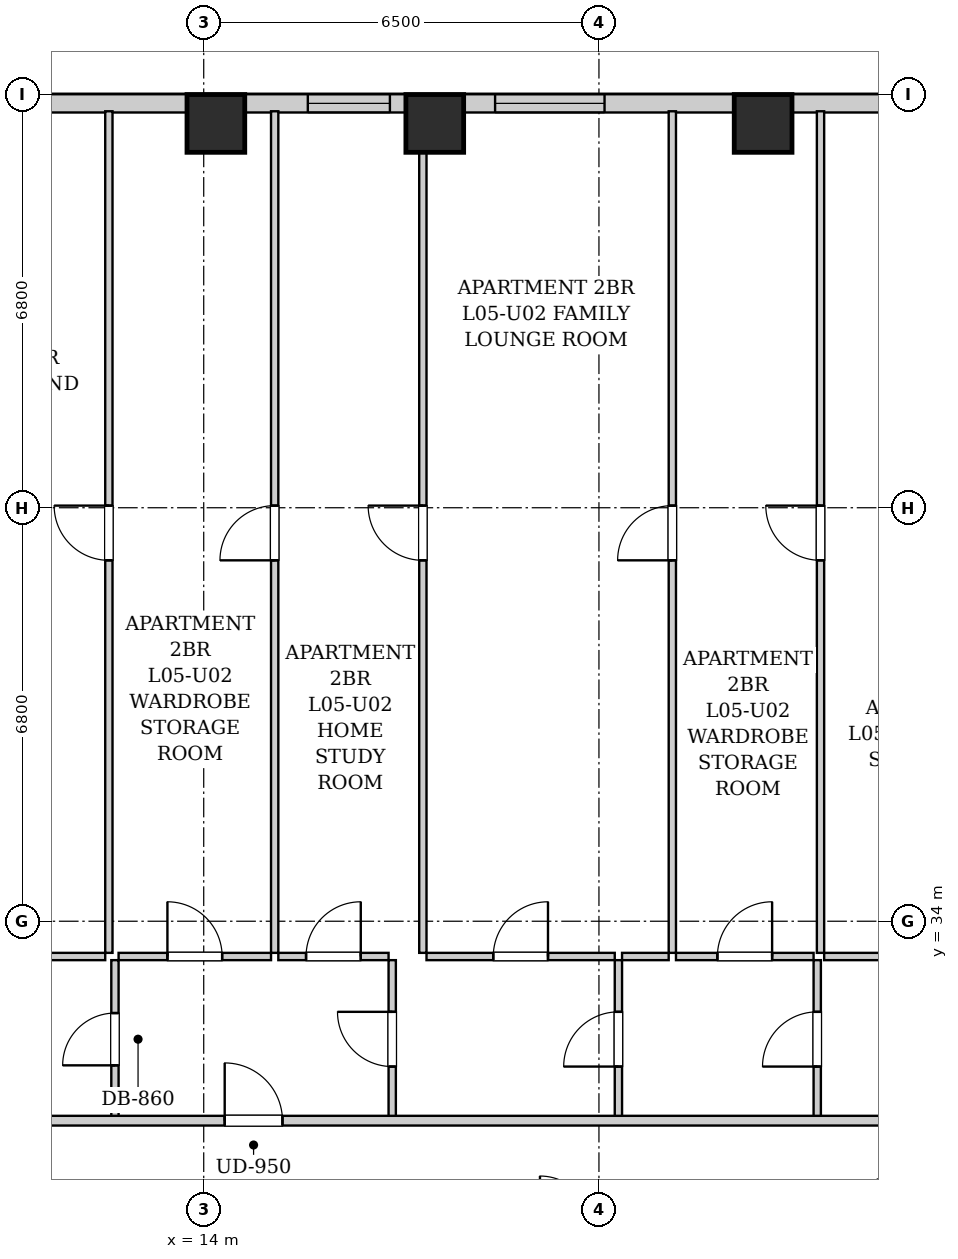
"""IFC4 building model, lengths in metres.
Left out: names, types, materials, properties, quantities, classifications, styles, units other than length and angle.
Written with IfcOpenShell. Run it as: python <this file> out.ifc"""

import sys

from ifc_helpers import new_model, si_unit, direction, frame, frame_2d, origin, origin_2d, place, context, subcontext, project, spatial, rectangle, extrude, element, fill, save


model = new_model("IFC4")
c1 = context("Model", 3, precision=1e-05, world=origin(), true_north=direction((0.0, 1.0)))
c2 = subcontext(c1, "Body", "Model", "MODEL_VIEW")
j1 = project(units=[si_unit("LENGTHUNIT", "METRE"), si_unit("PLANEANGLEUNIT", "RADIAN")], contexts=[c1])
p1 = place(None, origin())
s1 = spatial("IfcSite", under=j1, at=p1, CompositionType="ELEMENT")
p2 = place(p1, origin())
s2 = spatial("IfcBuilding", under=s1, at=p2, CompositionType="ELEMENT")
p3 = place(p2, frame((0.0, 0.0, 25.8)))
s3 = spatial("IfcBuildingStorey", under=s2, at=p3, CompositionType="ELEMENT", Elevation=25.8)
for number, where, z_axis, x_axis in (
    (1, (14.2, 47.12, 0.0), (0.0, 0.0, 1.0), (1.0, 0.0, 0.0)),
    (2, (17.8, 47.12, 0.0), (0.0, 0.0, 1.0), (1.0, 0.0, 0.0)),
    (3, (23.2, 47.12, 0.0), (0.0, 0.0, 1.0), (1.0, 0.0, 0.0)),
):
    element("IfcColumn", number, at=place(p3, frame(where, z_axis=z_axis, x_axis=x_axis)), inside=s3, PredefinedType="COLUMN", context=c2, shape_type="SweptSolid", body=[
        extrude(rectangle(XDim=0.95, YDim=0.95, at=origin_2d()), origin(), (0.0, 0.0, 1.0), 3.2),
    ])
p4 = place(p3, frame((10.0, 47.45, 0.0), z_axis=(0.0, 0.0, 1.0), x_axis=(1.0, 0.0, 0.0)))
e4 = element("IfcWall", 4, at=p4, inside=s3, PredefinedType="SOLIDWALL", context=c2, shape_type="SweptSolid", body=[
    extrude(rectangle(XDim=28.1, YDim=0.3, at=frame_2d((14.05, 0.0))), origin(), (0.0, 0.0, 1.0), 1.975),
])
p5 = place(p4, frame((5.712, 0.0, 0.55)))
e5 = element("IfcOpeningElement", 5, at=p5, cuts=e4, PredefinedType="OPENING", context=c2, shape_type="SweptSolid", body=[
    extrude(rectangle(XDim=1.35, YDim=1.2, at=frame_2d((0.675, 0.6))), frame((0.0, 0.16, 0.0), z_axis=(0.0, -1.0, 0.0), x_axis=(1.0, 0.0, 0.0)), (0.0, 0.0, 1.0), 0.32),
])
p6 = place(p4, frame((8.792, 0.0, 0.55)))
e6 = element("IfcOpeningElement", 6, at=p6, cuts=e4, PredefinedType="OPENING", context=c2, shape_type="SweptSolid", body=[
    extrude(rectangle(XDim=1.8, YDim=1.2, at=frame_2d((0.9, 0.6))), frame((0.0, 0.16, 0.0), z_axis=(0.0, -1.0, 0.0), x_axis=(1.0, 0.0, 0.0)), (0.0, 0.0, 1.0), 0.32),
])
p7 = place(p4, frame((18.86, 0.0, 0.55)))
e7 = element("IfcOpeningElement", 7, at=p7, cuts=e4, PredefinedType="OPENING", context=c2, shape_type="SweptSolid", body=[
    extrude(rectangle(XDim=1.8, YDim=1.2, at=frame_2d((0.9, 0.6))), frame((0.0, 0.16, 0.0), z_axis=(0.0, -1.0, 0.0), x_axis=(1.0, 0.0, 0.0)), (0.0, 0.0, 1.0), 0.32),
])
p8 = place(p4, frame((21.215, 0.0, 0.55)))
e8 = element("IfcOpeningElement", 8, at=p8, cuts=e4, PredefinedType="OPENING", context=c2, shape_type="SweptSolid", body=[
    extrude(rectangle(XDim=1.35, YDim=1.2, at=frame_2d((0.675, 0.6))), frame((0.0, 0.16, 0.0), z_axis=(0.0, -1.0, 0.0), x_axis=(1.0, 0.0, 0.0)), (0.0, 0.0, 1.0), 0.32),
])
p9 = place(p4, frame((23.969, 0.0, 0.55)))
e9 = element("IfcOpeningElement", 9, at=p9, cuts=e4, PredefinedType="OPENING", context=c2, shape_type="SweptSolid", body=[
    extrude(rectangle(XDim=1.8, YDim=1.2, at=frame_2d((0.9, 0.6))), frame((0.0, 0.16, 0.0), z_axis=(0.0, -1.0, 0.0), x_axis=(1.0, 0.0, 0.0)), (0.0, 0.0, 1.0), 0.32),
])
p10 = place(p4, frame((26.698, 0.0, 0.55)))
e10 = element("IfcOpeningElement", 10, at=p10, cuts=e4, PredefinedType="OPENING", context=c2, shape_type="SweptSolid", body=[
    extrude(rectangle(XDim=0.85, YDim=1.2, at=frame_2d((0.425, 0.6))), frame((0.0, 0.16, 0.0), z_axis=(0.0, -1.0, 0.0), x_axis=(1.0, 0.0, 0.0)), (0.0, 0.0, 1.0), 0.32),
])
p11 = place(p3, frame((12.54, 30.76, 0.0), z_axis=(0.0, 0.0, 1.0), x_axis=(0.0, 1.0, 0.0)))
e11 = element("IfcWall", 11, at=p11, inside=s3, PredefinedType="PARTITIONING", context=c2, shape_type="SweptSolid", body=[
    extrude(rectangle(XDim=2.6, YDim=0.12, at=frame_2d((1.3, 0.0))), origin(), (0.0, 0.0, 1.0), 2.94),
])
p12 = place(p11, frame((0.87, 0.0, 0.0)))
e12 = element("IfcOpeningElement", 12, at=p12, cuts=e11, PredefinedType="OPENING", context=c2, shape_type="SweptSolid", body=[
    extrude(rectangle(XDim=0.86, YDim=2.05, at=frame_2d((0.43, 1.025))), frame((0.0, 0.07, 0.0), z_axis=(0.0, -1.0, 0.0), x_axis=(1.0, 0.0, 0.0)), (0.0, 0.0, 1.0), 0.14),
])
p13 = place(p3, frame((10.08, 33.42, 0.0), z_axis=(0.0, 0.0, 1.0), x_axis=(1.0, 0.0, 0.0)))
e13 = element("IfcWall", 13, at=p13, inside=s3, PredefinedType="PARTITIONING", context=c2, shape_type="SweptSolid", body=[
    extrude(rectangle(XDim=2.3, YDim=0.12, at=frame_2d((1.15, 0.0))), origin(), (0.0, 0.0, 1.0), 2.94),
])
p14 = place(p3, frame((17.1, 30.76, 0.0), z_axis=(0.0, 0.0, 1.0), x_axis=(0.0, 1.0, 0.0)))
e14 = element("IfcWall", 14, at=p14, inside=s3, PredefinedType="PARTITIONING", context=c2, shape_type="SweptSolid", body=[
    extrude(rectangle(XDim=2.6, YDim=0.12, at=frame_2d((1.3, 0.0))), origin(), (0.0, 0.0, 1.0), 2.94),
])
p15 = place(p14, frame((0.85, 0.0, 0.0)))
e15 = element("IfcOpeningElement", 15, at=p15, cuts=e14, PredefinedType="OPENING", context=c2, shape_type="SweptSolid", body=[
    extrude(rectangle(XDim=0.9, YDim=2.05, at=frame_2d((0.45, 1.025))), frame((0.0, 0.07, 0.0), z_axis=(0.0, -1.0, 0.0), x_axis=(1.0, 0.0, 0.0)), (0.0, 0.0, 1.0), 0.14),
])
p16 = place(p3, frame((12.6, 33.42, 0.0), z_axis=(0.0, 0.0, 1.0), x_axis=(1.0, 0.0, 0.0)))
e16 = element("IfcWall", 16, at=p16, inside=s3, PredefinedType="PARTITIONING", context=c2, shape_type="SweptSolid", body=[
    extrude(rectangle(XDim=2.507, YDim=0.12, at=frame_2d((1.253, 0.0))), origin(), (0.0, 0.0, 1.0), 2.94),
])
p17 = place(p16, frame((0.803, 0.0, 0.0)))
e17 = element("IfcOpeningElement", 17, at=p17, cuts=e16, PredefinedType="OPENING", context=c2, shape_type="SweptSolid", body=[
    extrude(rectangle(XDim=0.9, YDim=2.05, at=frame_2d((0.45, 1.025))), frame((0.0, 0.07, 0.0), z_axis=(0.0, -1.0, 0.0), x_axis=(1.0, 0.0, 0.0)), (0.0, 0.0, 1.0), 0.14),
])
p18 = place(p3, frame((15.227, 33.42, 0.0), z_axis=(0.0, 0.0, 1.0), x_axis=(1.0, 0.0, 0.0)))
e18 = element("IfcWall", 18, at=p18, inside=s3, PredefinedType="PARTITIONING", context=c2, shape_type="SweptSolid", body=[
    extrude(rectangle(XDim=1.813, YDim=0.12, at=frame_2d((0.906, 0.0))), origin(), (0.0, 0.0, 1.0), 2.94),
])
p19 = place(p18, frame((0.456, 0.0, 0.0)))
e19 = element("IfcOpeningElement", 19, at=p19, cuts=e18, PredefinedType="OPENING", context=c2, shape_type="SweptSolid", body=[
    extrude(rectangle(XDim=0.9, YDim=2.05, at=frame_2d((0.45, 1.025))), frame((0.0, 0.07, 0.0), z_axis=(0.0, -1.0, 0.0), x_axis=(1.0, 0.0, 0.0)), (0.0, 0.0, 1.0), 0.14),
])
p20 = place(p3, frame((20.82, 30.76, 0.0), z_axis=(0.0, 0.0, 1.0), x_axis=(0.0, 1.0, 0.0)))
e20 = element("IfcWall", 20, at=p20, inside=s3, PredefinedType="PARTITIONING", context=c2, shape_type="SweptSolid", body=[
    extrude(rectangle(XDim=2.6, YDim=0.12, at=frame_2d((1.3, 0.0))), origin(), (0.0, 0.0, 1.0), 2.94),
])
p21 = place(p20, frame((0.85, 0.0, 0.0)))
e21 = element("IfcOpeningElement", 21, at=p21, cuts=e20, PredefinedType="OPENING", context=c2, shape_type="SweptSolid", body=[
    extrude(rectangle(XDim=0.9, YDim=2.05, at=frame_2d((0.45, 1.025))), frame((0.0, 0.07, 0.0), z_axis=(0.0, -1.0, 0.0), x_axis=(1.0, 0.0, 0.0)), (0.0, 0.0, 1.0), 0.14),
])
p22 = place(p3, frame((17.664, 33.42, 0.0), z_axis=(0.0, 0.0, 1.0), x_axis=(1.0, 0.0, 0.0)))
e22 = element("IfcWall", 22, at=p22, inside=s3, PredefinedType="PARTITIONING", context=c2, shape_type="SweptSolid", body=[
    extrude(rectangle(XDim=3.096, YDim=0.12, at=frame_2d((1.548, 0.0))), origin(), (0.0, 0.0, 1.0), 2.94),
])
p23 = place(p22, frame((1.098, 0.0, 0.0)))
e23 = element("IfcOpeningElement", 23, at=p23, cuts=e22, PredefinedType="OPENING", context=c2, shape_type="SweptSolid", body=[
    extrude(rectangle(XDim=0.9, YDim=2.05, at=frame_2d((0.45, 1.025))), frame((0.0, 0.07, 0.0), z_axis=(0.0, -1.0, 0.0), x_axis=(1.0, 0.0, 0.0)), (0.0, 0.0, 1.0), 0.14),
])
p24 = place(p3, frame((24.09, 30.76, 0.0), z_axis=(0.0, 0.0, 1.0), x_axis=(0.0, 1.0, 0.0)))
e24 = element("IfcWall", 24, at=p24, inside=s3, PredefinedType="PARTITIONING", context=c2, shape_type="SweptSolid", body=[
    extrude(rectangle(XDim=2.6, YDim=0.12, at=frame_2d((1.3, 0.0))), origin(), (0.0, 0.0, 1.0), 2.94),
])
p25 = place(p24, frame((0.85, 0.0, 0.0)))
e25 = element("IfcOpeningElement", 25, at=p25, cuts=e24, PredefinedType="OPENING", context=c2, shape_type="SweptSolid", body=[
    extrude(rectangle(XDim=0.9, YDim=2.05, at=frame_2d((0.45, 1.025))), frame((0.0, 0.07, 0.0), z_axis=(0.0, -1.0, 0.0), x_axis=(1.0, 0.0, 0.0)), (0.0, 0.0, 1.0), 0.14),
])
p26 = place(p3, frame((20.88, 33.42, 0.0), z_axis=(0.0, 0.0, 1.0), x_axis=(1.0, 0.0, 0.0)))
e26 = element("IfcWall", 26, at=p26, inside=s3, PredefinedType="PARTITIONING", context=c2, shape_type="SweptSolid", body=[
    extrude(rectangle(XDim=0.767, YDim=0.12, at=frame_2d((0.384, 0.0))), origin(), (0.0, 0.0, 1.0), 2.94),
])
p27 = place(p3, frame((21.767, 33.42, 0.0), z_axis=(0.0, 0.0, 1.0), x_axis=(1.0, 0.0, 0.0)))
e27 = element("IfcWall", 27, at=p27, inside=s3, PredefinedType="PARTITIONING", context=c2, shape_type="SweptSolid", body=[
    extrude(rectangle(XDim=2.263, YDim=0.12, at=frame_2d((1.131, 0.0))), origin(), (0.0, 0.0, 1.0), 2.94),
])
p28 = place(p27, frame((0.681, 0.0, 0.0)))
e28 = element("IfcOpeningElement", 28, at=p28, cuts=e27, PredefinedType="OPENING", context=c2, shape_type="SweptSolid", body=[
    extrude(rectangle(XDim=0.9, YDim=2.05, at=frame_2d((0.45, 1.025))), frame((0.0, 0.07, 0.0), z_axis=(0.0, -1.0, 0.0), x_axis=(1.0, 0.0, 0.0)), (0.0, 0.0, 1.0), 0.14),
])
p29 = place(p3, frame((24.204, 33.42, 0.0), z_axis=(0.0, 0.0, 1.0), x_axis=(1.0, 0.0, 0.0)))
e29 = element("IfcWall", 29, at=p29, inside=s3, PredefinedType="PARTITIONING", context=c2, shape_type="SweptSolid", body=[
    extrude(rectangle(XDim=3.546, YDim=0.12, at=frame_2d((1.773, 0.0))), origin(), (0.0, 0.0, 1.0), 2.94),
])
p30 = place(p29, frame((1.323, 0.0, 0.0)))
e30 = element("IfcOpeningElement", 30, at=p30, cuts=e29, PredefinedType="OPENING", context=c2, shape_type="SweptSolid", body=[
    extrude(rectangle(XDim=0.9, YDim=2.05, at=frame_2d((0.45, 1.025))), frame((0.0, 0.07, 0.0), z_axis=(0.0, -1.0, 0.0), x_axis=(1.0, 0.0, 0.0)), (0.0, 0.0, 1.0), 0.14),
])
p31 = place(p3, frame((12.44, 33.48, 0.0), z_axis=(0.0, 0.0, 1.0), x_axis=(0.0, 1.0, 0.0)))
e31 = element("IfcWall", 31, at=p31, inside=s3, PredefinedType="PARTITIONING", context=c2, shape_type="SweptSolid", body=[
    extrude(rectangle(XDim=13.84, YDim=0.12, at=frame_2d((6.92, 0.0))), origin(), (0.0, 0.0, 1.0), 2.94),
])
p32 = place(p31, frame((6.455, 0.0, 0.0)))
e32 = element("IfcOpeningElement", 32, at=p32, cuts=e31, PredefinedType="OPENING", context=c2, shape_type="SweptSolid", body=[
    extrude(rectangle(XDim=0.9, YDim=2.05, at=frame_2d((0.45, 1.025))), frame((0.0, 0.07, 0.0), z_axis=(0.0, -1.0, 0.0), x_axis=(1.0, 0.0, 0.0)), (0.0, 0.0, 1.0), 0.14),
])
p33 = place(p3, frame((15.167, 33.48, 0.0), z_axis=(0.0, 0.0, 1.0), x_axis=(0.0, 1.0, 0.0)))
e33 = element("IfcWall", 33, at=p33, inside=s3, PredefinedType="PARTITIONING", context=c2, shape_type="SweptSolid", body=[
    extrude(rectangle(XDim=13.84, YDim=0.12, at=frame_2d((6.92, 0.0))), origin(), (0.0, 0.0, 1.0), 2.94),
])
p34 = place(p33, frame((6.455, 0.0, 0.0)))
e34 = element("IfcOpeningElement", 34, at=p34, cuts=e33, PredefinedType="OPENING", context=c2, shape_type="SweptSolid", body=[
    extrude(rectangle(XDim=0.9, YDim=2.05, at=frame_2d((0.45, 1.025))), frame((0.0, 0.07, 0.0), z_axis=(0.0, -1.0, 0.0), x_axis=(1.0, 0.0, 0.0)), (0.0, 0.0, 1.0), 0.14),
])
p35 = place(p3, frame((17.604, 33.48, 0.0), z_axis=(0.0, 0.0, 1.0), x_axis=(0.0, 1.0, 0.0)))
e35 = element("IfcWall", 35, at=p35, inside=s3, PredefinedType="PARTITIONING", context=c2, shape_type="SweptSolid", body=[
    extrude(rectangle(XDim=13.84, YDim=0.12, at=frame_2d((6.92, 0.0))), origin(), (0.0, 0.0, 1.0), 2.94),
])
p36 = place(p35, frame((6.455, 0.0, 0.0)))
e36 = element("IfcOpeningElement", 36, at=p36, cuts=e35, PredefinedType="OPENING", context=c2, shape_type="SweptSolid", body=[
    extrude(rectangle(XDim=0.9, YDim=2.05, at=frame_2d((0.45, 1.025))), frame((0.0, 0.07, 0.0), z_axis=(0.0, -1.0, 0.0), x_axis=(1.0, 0.0, 0.0)), (0.0, 0.0, 1.0), 0.14),
])
p37 = place(p3, frame((21.707, 33.48, 0.0), z_axis=(0.0, 0.0, 1.0), x_axis=(0.0, 1.0, 0.0)))
e37 = element("IfcWall", 37, at=p37, inside=s3, PredefinedType="PARTITIONING", context=c2, shape_type="SweptSolid", body=[
    extrude(rectangle(XDim=13.84, YDim=0.12, at=frame_2d((6.92, 0.0))), origin(), (0.0, 0.0, 1.0), 2.94),
])
p38 = place(p37, frame((6.455, 0.0, 0.0)))
e38 = element("IfcOpeningElement", 38, at=p38, cuts=e37, PredefinedType="OPENING", context=c2, shape_type="SweptSolid", body=[
    extrude(rectangle(XDim=0.9, YDim=2.05, at=frame_2d((0.45, 1.025))), frame((0.0, 0.07, 0.0), z_axis=(0.0, -1.0, 0.0), x_axis=(1.0, 0.0, 0.0)), (0.0, 0.0, 1.0), 0.14),
])
p39 = place(p3, frame((24.144, 33.48, 0.0), z_axis=(0.0, 0.0, 1.0), x_axis=(0.0, 1.0, 0.0)))
e39 = element("IfcWall", 39, at=p39, inside=s3, PredefinedType="PARTITIONING", context=c2, shape_type="SweptSolid", body=[
    extrude(rectangle(XDim=13.84, YDim=0.12, at=frame_2d((6.92, 0.0))), origin(), (0.0, 0.0, 1.0), 2.94),
])
p40 = place(p39, frame((6.455, 0.0, 0.0)))
e40 = element("IfcOpeningElement", 40, at=p40, cuts=e39, PredefinedType="OPENING", context=c2, shape_type="SweptSolid", body=[
    extrude(rectangle(XDim=0.9, YDim=2.05, at=frame_2d((0.45, 1.025))), frame((0.0, 0.07, 0.0), z_axis=(0.0, -1.0, 0.0), x_axis=(1.0, 0.0, 0.0)), (0.0, 0.0, 1.0), 0.14),
])
p41 = place(p3, frame((10.05, 30.72, 0.0), z_axis=(0.0, 0.0, 1.0), x_axis=(1.0, 0.0, 0.0)))
e41 = element("IfcWall", 41, at=p41, inside=s3, PredefinedType="PARTITIONING", context=c2, shape_type="SweptSolid", body=[
    extrude(rectangle(XDim=33.9, YDim=0.16, at=frame_2d((16.95, 0.0))), origin(), (0.0, 0.0, 1.0), 2.94),
])
p42 = place(p41, frame((4.295, 0.0, 0.0)))
e42 = element("IfcOpeningElement", 42, at=p42, cuts=e41, PredefinedType="OPENING", context=c2, shape_type="SweptSolid", body=[
    extrude(rectangle(XDim=0.95, YDim=2.1, at=frame_2d((0.475, 1.05))), frame((0.0, 0.09, 0.0), z_axis=(0.0, -1.0, 0.0), x_axis=(1.0, 0.0, 0.0)), (0.0, 0.0, 1.0), 0.18),
])
p43 = place(p41, frame((27.235, 0.0, 0.0)))
e43 = element("IfcOpeningElement", 43, at=p43, cuts=e41, PredefinedType="OPENING", context=c2, shape_type="SweptSolid", body=[
    extrude(rectangle(XDim=0.95, YDim=2.1, at=frame_2d((0.475, 1.05))), frame((0.0, 0.09, 0.0), z_axis=(0.0, -1.0, 0.0), x_axis=(1.0, 0.0, 0.0)), (0.0, 0.0, 1.0), 0.18),
])
p44 = place(p12, origin())
e44 = element("IfcDoor", 44, at=p44, inside=s3, OperationType="SINGLE_SWING_LEFT", PredefinedType="DOOR", context=c2, shape_type="SweptSolid", body=[
    extrude(rectangle(XDim=0.86, YDim=2.05, at=frame_2d((0.43, 1.025))), frame((0.0, 0.025, 0.0), z_axis=(0.0, -1.0, 0.0), x_axis=(1.0, 0.0, 0.0)), (0.0, 0.0, 1.0), 0.05),
])
fill(e12, e44)
p45 = place(p15, origin())
e45 = element("IfcDoor", 45, at=p45, inside=s3, OperationType="SINGLE_SWING_RIGHT", PredefinedType="DOOR", context=c2, shape_type="SweptSolid", body=[
    extrude(rectangle(XDim=0.9, YDim=2.05, at=frame_2d((0.45, 1.025))), frame((0.0, 0.025, 0.0), z_axis=(0.0, -1.0, 0.0), x_axis=(1.0, 0.0, 0.0)), (0.0, 0.0, 1.0), 0.05),
])
fill(e15, e45)
p46 = place(p17, origin())
e46 = element("IfcDoor", 46, at=p46, inside=s3, OperationType="SINGLE_SWING_LEFT", PredefinedType="DOOR", context=c2, shape_type="SweptSolid", body=[
    extrude(rectangle(XDim=0.9, YDim=2.05, at=frame_2d((0.45, 1.025))), frame((0.0, 0.025, 0.0), z_axis=(0.0, -1.0, 0.0), x_axis=(1.0, 0.0, 0.0)), (0.0, 0.0, 1.0), 0.05),
])
fill(e17, e46)
p47 = place(p19, origin())
e47 = element("IfcDoor", 47, at=p47, inside=s3, OperationType="SINGLE_SWING_RIGHT", PredefinedType="DOOR", context=c2, shape_type="SweptSolid", body=[
    extrude(rectangle(XDim=0.9, YDim=2.05, at=frame_2d((0.45, 1.025))), frame((0.0, 0.025, 0.0), z_axis=(0.0, -1.0, 0.0), x_axis=(1.0, 0.0, 0.0)), (0.0, 0.0, 1.0), 0.05),
])
fill(e19, e47)
p48 = place(p21, origin())
e48 = element("IfcDoor", 48, at=p48, inside=s3, OperationType="SINGLE_SWING_LEFT", PredefinedType="DOOR", context=c2, shape_type="SweptSolid", body=[
    extrude(rectangle(XDim=0.9, YDim=2.05, at=frame_2d((0.45, 1.025))), frame((0.0, 0.025, 0.0), z_axis=(0.0, -1.0, 0.0), x_axis=(1.0, 0.0, 0.0)), (0.0, 0.0, 1.0), 0.05),
])
fill(e21, e48)
p49 = place(p23, origin())
e49 = element("IfcDoor", 49, at=p49, inside=s3, OperationType="SINGLE_SWING_RIGHT", PredefinedType="DOOR", context=c2, shape_type="SweptSolid", body=[
    extrude(rectangle(XDim=0.9, YDim=2.05, at=frame_2d((0.45, 1.025))), frame((0.0, 0.025, 0.0), z_axis=(0.0, -1.0, 0.0), x_axis=(1.0, 0.0, 0.0)), (0.0, 0.0, 1.0), 0.05),
])
fill(e23, e49)
p50 = place(p25, origin())
e50 = element("IfcDoor", 50, at=p50, inside=s3, OperationType="SINGLE_SWING_LEFT", PredefinedType="DOOR", context=c2, shape_type="SweptSolid", body=[
    extrude(rectangle(XDim=0.9, YDim=2.05, at=frame_2d((0.45, 1.025))), frame((0.0, 0.025, 0.0), z_axis=(0.0, -1.0, 0.0), x_axis=(1.0, 0.0, 0.0)), (0.0, 0.0, 1.0), 0.05),
])
fill(e25, e50)
p51 = place(p28, origin())
e51 = element("IfcDoor", 51, at=p51, inside=s3, OperationType="SINGLE_SWING_RIGHT", PredefinedType="DOOR", context=c2, shape_type="SweptSolid", body=[
    extrude(rectangle(XDim=0.9, YDim=2.05, at=frame_2d((0.45, 1.025))), frame((0.0, 0.025, 0.0), z_axis=(0.0, -1.0, 0.0), x_axis=(1.0, 0.0, 0.0)), (0.0, 0.0, 1.0), 0.05),
])
fill(e28, e51)
p52 = place(p32, origin())
e52 = element("IfcDoor", 52, at=p52, inside=s3, OperationType="SINGLE_SWING_RIGHT", PredefinedType="DOOR", context=c2, shape_type="SweptSolid", body=[
    extrude(rectangle(XDim=0.9, YDim=2.05, at=frame_2d((0.45, 1.025))), frame((0.0, 0.025, 0.0), z_axis=(0.0, -1.0, 0.0), x_axis=(1.0, 0.0, 0.0)), (0.0, 0.0, 1.0), 0.05),
])
fill(e32, e52)
p53 = place(p34, origin())
e53 = element("IfcDoor", 53, at=p53, inside=s3, OperationType="SINGLE_SWING_LEFT", PredefinedType="DOOR", context=c2, shape_type="SweptSolid", body=[
    extrude(rectangle(XDim=0.9, YDim=2.05, at=frame_2d((0.45, 1.025))), frame((0.0, 0.025, 0.0), z_axis=(0.0, -1.0, 0.0), x_axis=(1.0, 0.0, 0.0)), (0.0, 0.0, 1.0), 0.05),
])
fill(e34, e53)
p54 = place(p36, origin())
e54 = element("IfcDoor", 54, at=p54, inside=s3, OperationType="SINGLE_SWING_RIGHT", PredefinedType="DOOR", context=c2, shape_type="SweptSolid", body=[
    extrude(rectangle(XDim=0.9, YDim=2.05, at=frame_2d((0.45, 1.025))), frame((0.0, 0.025, 0.0), z_axis=(0.0, -1.0, 0.0), x_axis=(1.0, 0.0, 0.0)), (0.0, 0.0, 1.0), 0.05),
])
fill(e36, e54)
p55 = place(p38, origin())
e55 = element("IfcDoor", 55, at=p55, inside=s3, OperationType="SINGLE_SWING_LEFT", PredefinedType="DOOR", context=c2, shape_type="SweptSolid", body=[
    extrude(rectangle(XDim=0.9, YDim=2.05, at=frame_2d((0.45, 1.025))), frame((0.0, 0.025, 0.0), z_axis=(0.0, -1.0, 0.0), x_axis=(1.0, 0.0, 0.0)), (0.0, 0.0, 1.0), 0.05),
])
fill(e38, e55)
p56 = place(p40, origin())
e56 = element("IfcDoor", 56, at=p56, inside=s3, OperationType="SINGLE_SWING_RIGHT", PredefinedType="DOOR", context=c2, shape_type="SweptSolid", body=[
    extrude(rectangle(XDim=0.9, YDim=2.05, at=frame_2d((0.45, 1.025))), frame((0.0, 0.025, 0.0), z_axis=(0.0, -1.0, 0.0), x_axis=(1.0, 0.0, 0.0)), (0.0, 0.0, 1.0), 0.05),
])
fill(e40, e56)
p57 = place(p42, origin())
e57 = element("IfcDoor", 57, at=p57, inside=s3, OperationType="SINGLE_SWING_LEFT", PredefinedType="DOOR", context=c2, shape_type="SweptSolid", body=[
    extrude(rectangle(XDim=0.95, YDim=2.1, at=frame_2d((0.475, 1.05))), frame((0.0, 0.025, 0.0), z_axis=(0.0, -1.0, 0.0), x_axis=(1.0, 0.0, 0.0)), (0.0, 0.0, 1.0), 0.05),
])
fill(e42, e57)
p58 = place(p5, origin())
e58 = element("IfcWindow", 58, at=p58, inside=s3, PartitioningType="SINGLE_PANEL", PredefinedType="WINDOW", context=c2, shape_type="SweptSolid", body=[
    extrude(rectangle(XDim=1.35, YDim=1.2, at=frame_2d((0.675, 0.6))), frame((0.0, 0.03, 0.0), z_axis=(0.0, -1.0, 0.0), x_axis=(1.0, 0.0, 0.0)), (0.0, 0.0, 1.0), 0.06),
])
fill(e5, e58)
p59 = place(p6, origin())
e59 = element("IfcWindow", 59, at=p59, inside=s3, PartitioningType="DOUBLE_PANEL_VERTICAL", PredefinedType="WINDOW", context=c2, shape_type="SweptSolid", body=[
    extrude(rectangle(XDim=1.8, YDim=1.2, at=frame_2d((0.9, 0.6))), frame((0.0, 0.03, 0.0), z_axis=(0.0, -1.0, 0.0), x_axis=(1.0, 0.0, 0.0)), (0.0, 0.0, 1.0), 0.06),
])
fill(e6, e59)
save(model, sys.argv[1])
